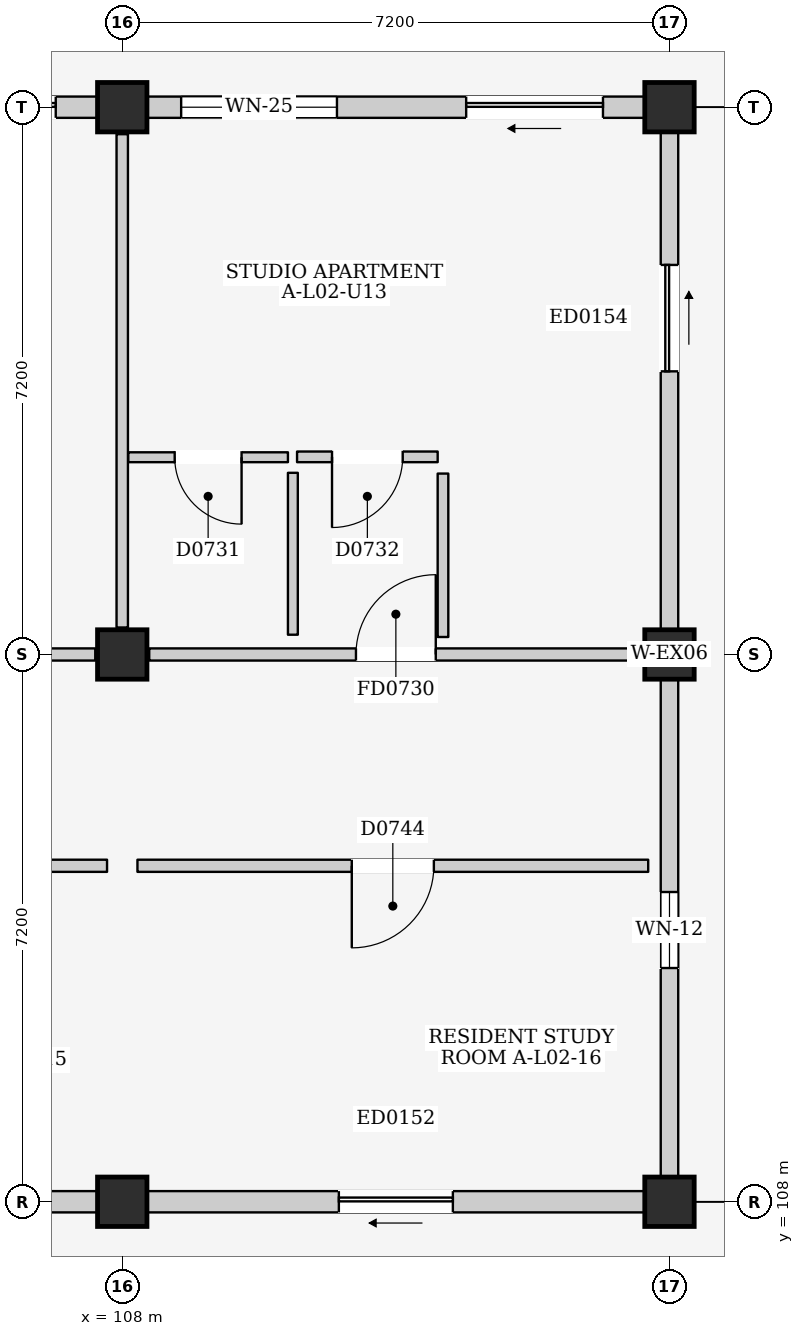
"""IFC4 building model, lengths in metres.
Left out: names, types, materials, properties, quantities, classifications, styles, units other than length and angle.
Written with IfcOpenShell. Run it as: python <this file> out.ifc"""

import sys

from ifc_helpers import new_model, si_unit, direction, frame, frame_2d, origin, origin_2d, place, context, subcontext, project, spatial, rectangle, extrude, element, fill, save


model = new_model("IFC4")
c1 = context("Model", 3, precision=1e-05, world=origin(), true_north=direction((0.0, 1.0)))
c2 = subcontext(c1, "Body", "Model", "MODEL_VIEW")
j1 = project(units=[si_unit("LENGTHUNIT", "METRE"), si_unit("PLANEANGLEUNIT", "RADIAN")], contexts=[c1])
p1 = place(None, origin())
s1 = spatial("IfcSite", under=j1, at=p1, CompositionType="ELEMENT")
p2 = place(p1, origin())
s2 = spatial("IfcBuilding", under=s1, at=p2, CompositionType="ELEMENT")
p3 = place(p2, frame((0.0, 0.0, 9.0)))
s3 = spatial("IfcBuildingStorey", under=s2, at=p3, CompositionType="ELEMENT", Elevation=9.0)
for number, where, z_axis, x_axis in (
    (1, (108.0, 108.0, 0.0), (0.0, 0.0, 1.0), (1.0, 0.0, 0.0)),
    (2, (108.0, 115.2, 0.0), (0.0, 0.0, 1.0), (1.0, 0.0, 0.0)),
    (3, (108.0, 122.4, 0.0), (0.0, 0.0, 1.0), (1.0, 0.0, 0.0)),
    (4, (115.2, 108.0, 0.0), (0.0, 0.0, 1.0), (1.0, 0.0, 0.0)),
    (5, (115.2, 115.2, 0.0), (0.0, 0.0, 1.0), (1.0, 0.0, 0.0)),
    (6, (115.2, 122.4, 0.0), (0.0, 0.0, 1.0), (1.0, 0.0, 0.0)),
):
    element("IfcColumn", number, at=place(p3, frame(where, z_axis=z_axis, x_axis=x_axis)), inside=s3, PredefinedType="COLUMN", context=c2, shape_type="SweptSolid", body=[
        extrude(rectangle(XDim=0.65, YDim=0.65, at=origin_2d()), origin(), (0.0, 0.0, 1.0), 3.2),
    ])
p4 = place(p3, frame((101.125, 122.4, 0.0), z_axis=(0.0, 0.0, 1.0), x_axis=(1.0, 0.0, 0.0)))
e7 = element("IfcWall", 7, at=p4, inside=s3, PredefinedType="ELEMENTEDWALL", context=c2, shape_type="SweptSolid", body=[
    extrude(rectangle(XDim=6.55, YDim=0.28, at=frame_2d((3.275, 0.0))), origin(), (0.0, 0.0, 1.0), 2.425),
])
p5 = place(p4, frame((4.6, 0.0, 0.0)))
e8 = element("IfcOpeningElement", 8, at=p5, cuts=e7, PredefinedType="OPENING", context=c2, shape_type="SweptSolid", body=[
    extrude(rectangle(XDim=1.4, YDim=2.1, at=frame_2d((0.7, 1.05))), frame((0.0, 0.155, 0.0), z_axis=(0.0, -1.0, 0.0), x_axis=(1.0, 0.0, 0.0)), (0.0, 0.0, 1.0), 0.31),
])
p6 = place(p4, frame((0.45, 0.0, 0.9)))
e9 = element("IfcOpeningElement", 9, at=p6, cuts=e7, PredefinedType="OPENING", context=c2, shape_type="SweptSolid", body=[
    extrude(rectangle(XDim=1.3, YDim=1.25, at=frame_2d((0.65, 0.625))), frame((0.0, 0.155, 0.0), z_axis=(0.0, -1.0, 0.0), x_axis=(1.0, 0.0, 0.0)), (0.0, 0.0, 1.0), 0.31),
])
p7 = place(p3, frame((101.125, 108.0, 0.0), z_axis=(0.0, 0.0, 1.0), x_axis=(1.0, 0.0, 0.0)))
e10 = element("IfcWall", 10, at=p7, inside=s3, PredefinedType="ELEMENTEDWALL", context=c2, shape_type="SweptSolid", body=[
    extrude(rectangle(XDim=6.55, YDim=0.28, at=frame_2d((3.275, 0.0))), origin(), (0.0, 0.0, 1.0), 2.295),
])
p8 = place(p7, frame((2.525, 0.0, 0.0)))
e11 = element("IfcOpeningElement", 11, at=p8, cuts=e10, PredefinedType="OPENING", context=c2, shape_type="SweptSolid", body=[
    extrude(rectangle(XDim=1.5, YDim=2.12, at=frame_2d((0.75, 1.06))), frame((0.0, 0.155, 0.0), z_axis=(0.0, -1.0, 0.0), x_axis=(1.0, 0.0, 0.0)), (0.0, 0.0, 1.0), 0.31),
])
p9 = place(p3, frame((108.325, 122.4, 0.0), z_axis=(0.0, 0.0, 1.0), x_axis=(1.0, 0.0, 0.0)))
e12 = element("IfcWall", 12, at=p9, inside=s3, PredefinedType="ELEMENTEDWALL", context=c2, shape_type="SweptSolid", body=[
    extrude(rectangle(XDim=6.55, YDim=0.28, at=frame_2d((3.275, 0.0))), origin(), (0.0, 0.0, 1.0), 2.425),
])
p10 = place(p9, frame((4.2, 0.0, 0.0)))
e13 = element("IfcOpeningElement", 13, at=p10, cuts=e12, PredefinedType="OPENING", context=c2, shape_type="SweptSolid", body=[
    extrude(rectangle(XDim=1.8, YDim=2.12, at=frame_2d((0.9, 1.06))), frame((0.0, 0.155, 0.0), z_axis=(0.0, -1.0, 0.0), x_axis=(1.0, 0.0, 0.0)), (0.0, 0.0, 1.0), 0.31),
])
p11 = place(p9, frame((0.45, 0.0, 0.715)))
e14 = element("IfcOpeningElement", 14, at=p11, cuts=e12, PredefinedType="OPENING", context=c2, shape_type="SweptSolid", body=[
    extrude(rectangle(XDim=2.05, YDim=1.6, at=frame_2d((1.025, 0.8))), frame((0.0, 0.155, 0.0), z_axis=(0.0, -1.0, 0.0), x_axis=(1.0, 0.0, 0.0)), (0.0, 0.0, 1.0), 0.31),
])
p12 = place(p3, frame((108.325, 108.0, 0.0), z_axis=(0.0, 0.0, 1.0), x_axis=(1.0, 0.0, 0.0)))
e15 = element("IfcWall", 15, at=p12, inside=s3, PredefinedType="ELEMENTEDWALL", context=c2, shape_type="SweptSolid", body=[
    extrude(rectangle(XDim=6.55, YDim=0.28, at=frame_2d((3.275, 0.0))), origin(), (0.0, 0.0, 1.0), 2.295),
])
p13 = place(p12, frame((2.525, 0.0, 0.0)))
e16 = element("IfcOpeningElement", 16, at=p13, cuts=e15, PredefinedType="OPENING", context=c2, shape_type="SweptSolid", body=[
    extrude(rectangle(XDim=1.5, YDim=2.12, at=frame_2d((0.75, 1.06))), frame((0.0, 0.155, 0.0), z_axis=(0.0, -1.0, 0.0), x_axis=(1.0, 0.0, 0.0)), (0.0, 0.0, 1.0), 0.31),
])
p14 = place(p3, frame((115.2, 108.325, 0.0), z_axis=(0.0, 0.0, 1.0), x_axis=(0.0, 1.0, 0.0)))
e17 = element("IfcWall", 17, at=p14, inside=s3, PredefinedType="ELEMENTEDWALL", context=c2, shape_type="SweptSolid", body=[
    extrude(rectangle(XDim=6.55, YDim=0.23, at=frame_2d((3.275, 0.0))), origin(), (0.0, 0.0, 1.0), 2.425),
])
p15 = place(p14, frame((2.75, 0.0, 1.1)))
e18 = element("IfcOpeningElement", 18, at=p15, cuts=e17, PredefinedType="OPENING", context=c2, shape_type="SweptSolid", body=[
    extrude(rectangle(XDim=1.0, YDim=0.9, at=frame_2d((0.5, 0.45))), frame((0.0, 0.13, 0.0), z_axis=(0.0, -1.0, 0.0), x_axis=(1.0, 0.0, 0.0)), (0.0, 0.0, 1.0), 0.26),
])
p16 = place(p3, frame((115.2, 115.525, 0.0), z_axis=(0.0, 0.0, 1.0), x_axis=(0.0, 1.0, 0.0)))
e19 = element("IfcWall", 19, at=p16, inside=s3, PredefinedType="ELEMENTEDWALL", context=c2, shape_type="SweptSolid", body=[
    extrude(rectangle(XDim=6.55, YDim=0.23, at=frame_2d((3.275, 0.0))), origin(), (0.0, 0.0, 1.0), 2.425),
])
p17 = place(p16, frame((3.4, 0.0, 0.0)))
e20 = element("IfcOpeningElement", 20, at=p17, cuts=e19, PredefinedType="OPENING", context=c2, shape_type="SweptSolid", body=[
    extrude(rectangle(XDim=1.4, YDim=2.1, at=frame_2d((0.7, 1.05))), frame((0.0, 0.13, 0.0), z_axis=(0.0, -1.0, 0.0), x_axis=(1.0, 0.0, 0.0)), (0.0, 0.0, 1.0), 0.26),
])
p18 = place(p3, frame((101.155, 115.2, 0.0), z_axis=(0.0, 0.0, 1.0), x_axis=(1.0, 0.0, 0.0)))
e21 = element("IfcWall", 21, at=p18, inside=s3, PredefinedType="PARTITIONING", context=c2, shape_type="SweptSolid", body=[
    extrude(rectangle(XDim=6.49, YDim=0.16, at=frame_2d((3.245, 0.0))), origin(), (0.0, 0.0, 1.0), 2.295),
])
p19 = place(p18, frame((2.72, 0.0, 0.0)))
e22 = element("IfcOpeningElement", 22, at=p19, cuts=e21, PredefinedType="OPENING", context=c2, shape_type="SweptSolid", body=[
    extrude(rectangle(XDim=1.05, YDim=2.15, at=frame_2d((0.525, 1.075))), frame((0.0, 0.095, 0.0), z_axis=(0.0, -1.0, 0.0), x_axis=(1.0, 0.0, 0.0)), (0.0, 0.0, 1.0), 0.19),
])
p20 = place(p3, frame((108.0, 115.555, 0.0), z_axis=(0.0, 0.0, 1.0), x_axis=(0.0, 1.0, 0.0)))
e23 = element("IfcWall", 23, at=p20, inside=s3, PredefinedType="PARTITIONING", context=c2, shape_type="SweptSolid", body=[
    extrude(rectangle(XDim=6.49, YDim=0.15, at=frame_2d((3.245, 0.0))), origin(), (0.0, 0.0, 1.0), 2.395),
])
p21 = place(p3, frame((108.355, 115.2, 0.0), z_axis=(0.0, 0.0, 1.0), x_axis=(1.0, 0.0, 0.0)))
e24 = element("IfcWall", 24, at=p21, inside=s3, PredefinedType="PARTITIONING", context=c2, shape_type="SweptSolid", body=[
    extrude(rectangle(XDim=6.49, YDim=0.16, at=frame_2d((3.245, 0.0))), origin(), (0.0, 0.0, 1.0), 2.295),
])
p22 = place(p21, frame((2.72, 0.0, 0.0)))
e25 = element("IfcOpeningElement", 25, at=p22, cuts=e24, PredefinedType="OPENING", context=c2, shape_type="SweptSolid", body=[
    extrude(rectangle(XDim=1.05, YDim=2.15, at=frame_2d((0.525, 1.075))), frame((0.0, 0.095, 0.0), z_axis=(0.0, -1.0, 0.0), x_axis=(1.0, 0.0, 0.0)), (0.0, 0.0, 1.0), 0.19),
])
p23 = place(p3, frame((108.08, 117.795, 0.0), z_axis=(0.0, 0.0, 1.0), x_axis=(1.0, 0.0, 0.0)))
e26 = element("IfcWall", 26, at=p23, inside=s3, PredefinedType="PARTITIONING", context=c2, shape_type="SweptSolid", body=[
    extrude(rectangle(XDim=2.1, YDim=0.13, at=frame_2d((1.05, 0.0))), origin(), (0.0, 0.0, 1.0), 2.96),
])
p24 = place(p23, frame((0.61, 0.0, 0.0)))
e27 = element("IfcOpeningElement", 27, at=p24, cuts=e26, PredefinedType="OPENING", context=c2, shape_type="SweptSolid", body=[
    extrude(rectangle(XDim=0.88, YDim=2.1, at=frame_2d((0.44, 1.05))), frame((0.0, 0.08, 0.0), z_axis=(0.0, -1.0, 0.0), x_axis=(1.0, 0.0, 0.0)), (0.0, 0.0, 1.0), 0.16),
])
p25 = place(p3, frame((110.245, 115.46, 0.0), z_axis=(0.0, 0.0, 1.0), x_axis=(0.0, 1.0, 0.0)))
e28 = element("IfcWall", 28, at=p25, inside=s3, PredefinedType="PARTITIONING", context=c2, shape_type="SweptSolid", body=[
    extrude(rectangle(XDim=2.13, YDim=0.13, at=frame_2d((1.065, 0.0))), origin(), (0.0, 0.0, 1.0), 2.96),
])
p26 = place(p3, frame((110.3, 117.8, 0.0), z_axis=(0.0, 0.0, 1.0), x_axis=(1.0, 0.0, 0.0)))
e29 = element("IfcWall", 29, at=p26, inside=s3, PredefinedType="PARTITIONING", context=c2, shape_type="SweptSolid", body=[
    extrude(rectangle(XDim=1.85, YDim=0.14, at=frame_2d((0.925, 0.0))), origin(), (0.0, 0.0, 1.0), 2.96),
])
p27 = place(p26, frame((0.46, 0.0, 0.0)))
e30 = element("IfcOpeningElement", 30, at=p27, cuts=e29, PredefinedType="OPENING", context=c2, shape_type="SweptSolid", body=[
    extrude(rectangle(XDim=0.93, YDim=2.14, at=frame_2d((0.465, 1.07))), frame((0.0, 0.085, 0.0), z_axis=(0.0, -1.0, 0.0), x_axis=(1.0, 0.0, 0.0)), (0.0, 0.0, 1.0), 0.17),
])
p28 = place(p3, frame((112.22, 115.43, 0.0), z_axis=(0.0, 0.0, 1.0), x_axis=(0.0, 1.0, 0.0)))
e31 = element("IfcWall", 31, at=p28, inside=s3, PredefinedType="PARTITIONING", context=c2, shape_type="SweptSolid", body=[
    extrude(rectangle(XDim=2.15, YDim=0.14, at=frame_2d((1.075, 0.0))), origin(), (0.0, 0.0, 1.0), 2.96),
])
p29 = place(p3, frame((101.0, 112.42, 0.0), z_axis=(0.0, 0.0, 1.0), x_axis=(1.0, 0.0, 0.0)))
e32 = element("IfcWall", 32, at=p29, inside=s3, PredefinedType="PARTITIONING", context=c2, shape_type="SweptSolid", body=[
    extrude(rectangle(XDim=6.8, YDim=0.16, at=frame_2d((3.4, 0.0))), origin(), (0.0, 0.0, 1.0), 2.96),
])
p30 = place(p29, frame((2.86, 0.0, 0.0)))
e33 = element("IfcOpeningElement", 33, at=p30, cuts=e32, PredefinedType="OPENING", context=c2, shape_type="SweptSolid", body=[
    extrude(rectangle(XDim=1.08, YDim=2.22, at=frame_2d((0.54, 1.11))), frame((0.0, 0.095, 0.0), z_axis=(0.0, -1.0, 0.0), x_axis=(1.0, 0.0, 0.0)), (0.0, 0.0, 1.0), 0.19),
])
p31 = place(p3, frame((108.2, 112.42, 0.0), z_axis=(0.0, 0.0, 1.0), x_axis=(1.0, 0.0, 0.0)))
e34 = element("IfcWall", 34, at=p31, inside=s3, PredefinedType="PARTITIONING", context=c2, shape_type="SweptSolid", body=[
    extrude(rectangle(XDim=6.72, YDim=0.16, at=frame_2d((3.36, 0.0))), origin(), (0.0, 0.0, 1.0), 2.96),
])
p32 = place(p31, frame((2.82, 0.0, 0.0)))
e35 = element("IfcOpeningElement", 35, at=p32, cuts=e34, PredefinedType="OPENING", context=c2, shape_type="SweptSolid", body=[
    extrude(rectangle(XDim=1.08, YDim=2.22, at=frame_2d((0.54, 1.11))), frame((0.0, 0.095, 0.0), z_axis=(0.0, -1.0, 0.0), x_axis=(1.0, 0.0, 0.0)), (0.0, 0.0, 1.0), 0.19),
])
p33 = place(p5, frame((1.4, 0.0, 0.0), z_axis=(0.0, 0.0, 1.0), x_axis=(-1.0, 0.0, 0.0)))
e36 = element("IfcDoor", 36, at=p33, inside=s3, OperationType="SLIDING_TO_RIGHT", PredefinedType="DOOR", context=c2, shape_type="SweptSolid", body=[
    extrude(rectangle(XDim=1.4, YDim=2.1, at=frame_2d((0.7, 1.05))), frame((0.0, 0.025, 0.0), z_axis=(0.0, -1.0, 0.0), x_axis=(1.0, 0.0, 0.0)), (0.0, 0.0, 1.0), 0.05),
])
fill(e8, e36)
p34 = place(p10, frame((1.8, 0.0, 0.0), z_axis=(0.0, 0.0, 1.0), x_axis=(-1.0, 0.0, 0.0)))
e37 = element("IfcDoor", 37, at=p34, inside=s3, OperationType="SLIDING_TO_LEFT", PredefinedType="DOOR", context=c2, shape_type="SweptSolid", body=[
    extrude(rectangle(XDim=1.8, YDim=2.12, at=frame_2d((0.9, 1.06))), frame((0.0, 0.025, 0.0), z_axis=(0.0, -1.0, 0.0), x_axis=(1.0, 0.0, 0.0)), (0.0, 0.0, 1.0), 0.05),
])
fill(e13, e37)
p35 = place(p11, origin())
e38 = element("IfcWindow", 38, at=p35, inside=s3, PartitioningType="DOUBLE_PANEL_VERTICAL", PredefinedType="WINDOW", context=c2, shape_type="SweptSolid", body=[
    extrude(rectangle(XDim=2.05, YDim=1.6, at=frame_2d((1.025, 0.8))), frame((0.0, 0.03, 0.0), z_axis=(0.0, -1.0, 0.0), x_axis=(1.0, 0.0, 0.0)), (0.0, 0.0, 1.0), 0.06),
])
fill(e14, e38)
p36 = place(p13, frame((1.5, 0.0, 0.0), z_axis=(0.0, 0.0, 1.0), x_axis=(-1.0, 0.0, 0.0)))
e39 = element("IfcDoor", 39, at=p36, inside=s3, OperationType="SLIDING_TO_LEFT", PredefinedType="DOOR", context=c2, shape_type="SweptSolid", body=[
    extrude(rectangle(XDim=1.5, YDim=2.12, at=frame_2d((0.75, 1.06))), frame((0.0, 0.025, 0.0), z_axis=(0.0, -1.0, 0.0), x_axis=(1.0, 0.0, 0.0)), (0.0, 0.0, 1.0), 0.05),
])
fill(e16, e39)
p37 = place(p15, origin())
e40 = element("IfcWindow", 40, at=p37, inside=s3, PartitioningType="SINGLE_PANEL", PredefinedType="WINDOW", context=c2, shape_type="SweptSolid", body=[
    extrude(rectangle(XDim=1.0, YDim=0.9, at=frame_2d((0.5, 0.45))), frame((0.0, 0.03, 0.0), z_axis=(0.0, -1.0, 0.0), x_axis=(1.0, 0.0, 0.0)), (0.0, 0.0, 1.0), 0.06),
])
fill(e18, e40)
p38 = place(p17, frame((1.4, 0.0, 0.0), z_axis=(0.0, 0.0, 1.0), x_axis=(-1.0, 0.0, 0.0)))
e41 = element("IfcDoor", 41, at=p38, inside=s3, OperationType="SLIDING_TO_RIGHT", PredefinedType="DOOR", context=c2, shape_type="SweptSolid", body=[
    extrude(rectangle(XDim=1.4, YDim=2.1, at=frame_2d((0.7, 1.05))), frame((0.0, 0.025, 0.0), z_axis=(0.0, -1.0, 0.0), x_axis=(1.0, 0.0, 0.0)), (0.0, 0.0, 1.0), 0.05),
])
fill(e20, e41)
p39 = place(p22, origin())
e42 = element("IfcDoor", 42, at=p39, inside=s3, OperationType="SINGLE_SWING_RIGHT", PredefinedType="DOOR", context=c2, shape_type="SweptSolid", body=[
    extrude(rectangle(XDim=1.05, YDim=2.15, at=frame_2d((0.525, 1.075))), frame((0.0, 0.025, 0.0), z_axis=(0.0, -1.0, 0.0), x_axis=(1.0, 0.0, 0.0)), (0.0, 0.0, 1.0), 0.05),
])
fill(e25, e42)
p40 = place(p24, frame((0.88, 0.0, 0.0), z_axis=(0.0, 0.0, 1.0), x_axis=(-1.0, 0.0, 0.0)))
e43 = element("IfcDoor", 43, at=p40, inside=s3, OperationType="SINGLE_SWING_LEFT", PredefinedType="DOOR", context=c2, shape_type="SweptSolid", body=[
    extrude(rectangle(XDim=0.88, YDim=2.1, at=frame_2d((0.44, 1.05))), frame((0.0, 0.025, 0.0), z_axis=(0.0, -1.0, 0.0), x_axis=(1.0, 0.0, 0.0)), (0.0, 0.0, 1.0), 0.05),
])
fill(e27, e43)
p41 = place(p27, frame((0.93, 0.0, 0.0), z_axis=(0.0, 0.0, 1.0), x_axis=(-1.0, 0.0, 0.0)))
e44 = element("IfcDoor", 44, at=p41, inside=s3, OperationType="SINGLE_SWING_RIGHT", PredefinedType="DOOR", context=c2, shape_type="SweptSolid", body=[
    extrude(rectangle(XDim=0.93, YDim=2.14, at=frame_2d((0.465, 1.07))), frame((0.0, 0.025, 0.0), z_axis=(0.0, -1.0, 0.0), x_axis=(1.0, 0.0, 0.0)), (0.0, 0.0, 1.0), 0.05),
])
fill(e30, e44)
p42 = place(p32, frame((1.08, 0.0, 0.0), z_axis=(0.0, 0.0, 1.0), x_axis=(-1.0, 0.0, 0.0)))
e45 = element("IfcDoor", 45, at=p42, inside=s3, OperationType="SINGLE_SWING_RIGHT", PredefinedType="DOOR", context=c2, shape_type="SweptSolid", body=[
    extrude(rectangle(XDim=1.08, YDim=2.22, at=frame_2d((0.54, 1.11))), frame((0.0, 0.025, 0.0), z_axis=(0.0, -1.0, 0.0), x_axis=(1.0, 0.0, 0.0)), (0.0, 0.0, 1.0), 0.05),
])
fill(e35, e45)
save(model, sys.argv[1])
